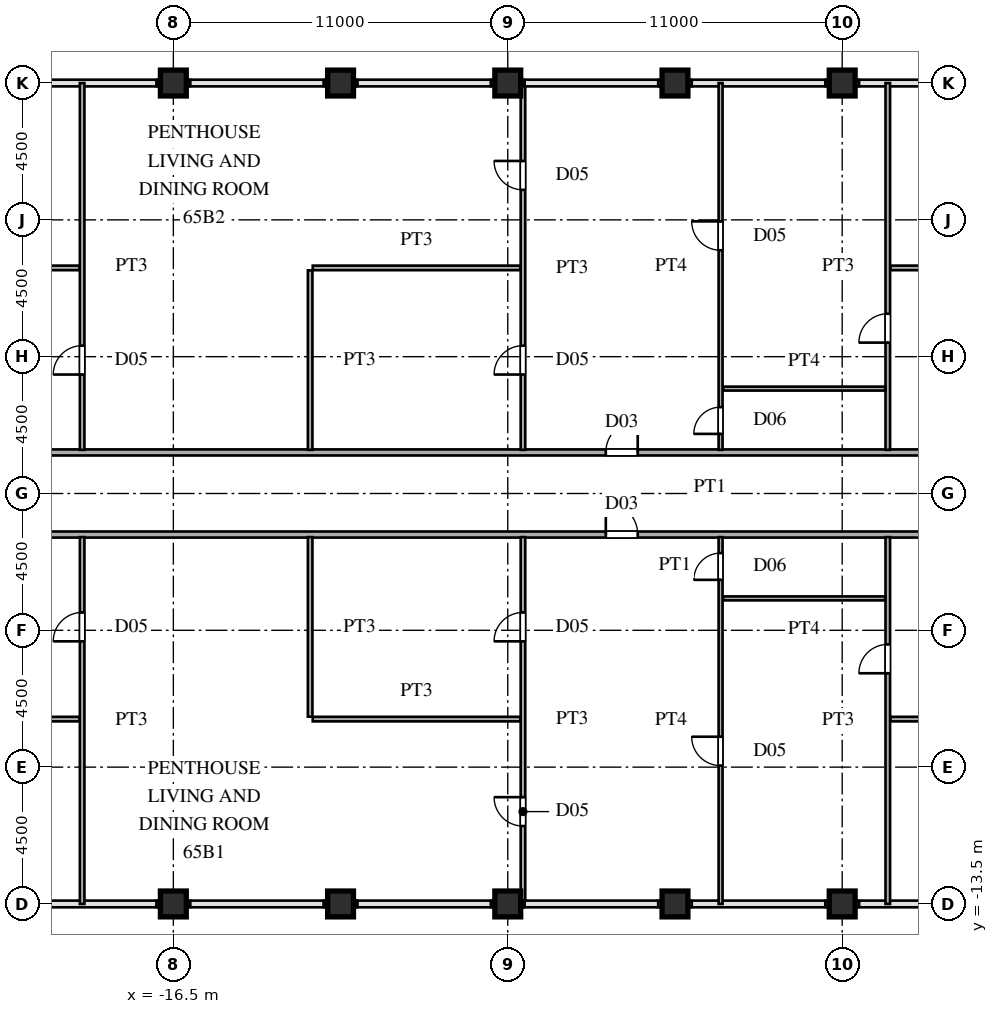
"""IFC4 building model, lengths in metres.
Left out: names, types, materials, properties, quantities, classifications, styles, units other than length and angle.
Written with IfcOpenShell. Run it as: python <this file> out.ifc"""

import sys

from ifc_helpers import new_model, si_unit, direction, frame, frame_2d, origin, origin_2d, place, context, subcontext, project, spatial, rectangle, hollow_rectangle, extrude, source, transform, mapped, element, fill, save


model = new_model("IFC4")
c1 = context("Model", 3, precision=1e-05, world=origin(), true_north=direction((0.0, 1.0)))
c2 = subcontext(c1, "Body", "Model", "MODEL_VIEW")
j1 = project(units=[si_unit("LENGTHUNIT", "METRE"), si_unit("PLANEANGLEUNIT", "RADIAN")], contexts=[c1])
p1 = place(None, origin())
s1 = spatial("IfcSite", under=j1, at=p1, CompositionType="ELEMENT")
p2 = place(p1, origin())
s2 = spatial("IfcBuilding", under=s1, at=p2, CompositionType="ELEMENT")
p3 = place(p2, frame((0.0, 0.0, 246.9)))
s3 = spatial("IfcBuildingStorey", under=s2, at=p3, CompositionType="ELEMENT", Elevation=246.9)
m1 = source(origin(), c2, "Body", "SweptSolid", [
    extrude(hollow_rectangle(XDim=0.85, YDim=0.85, WallThickness=0.036, at=origin_2d()), origin(), (0.0, 0.0, 1.0), 3.75),
])
for number, where, z_axis, x_axis in (
    (1, (-16.5, -13.5, 0.0), (0.0, 0.0, 1.0), (1.0, 0.0, 0.0)),
    (2, (-16.5, 13.5, 0.0), (0.0, 0.0, 1.0), (1.0, 0.0, 0.0)),
    (3, (-11.0, -13.5, 0.0), (0.0, 0.0, 1.0), (1.0, 0.0, 0.0)),
    (4, (-11.0, 13.5, 0.0), (0.0, 0.0, 1.0), (1.0, 0.0, 0.0)),
    (5, (-5.5, -13.5, 0.0), (0.0, 0.0, 1.0), (1.0, 0.0, 0.0)),
    (6, (-5.5, 13.5, 0.0), (0.0, 0.0, 1.0), (1.0, 0.0, 0.0)),
    (7, (0.0, -13.5, 0.0), (0.0, 0.0, 1.0), (1.0, 0.0, 0.0)),
    (8, (0.0, 13.5, 0.0), (0.0, 0.0, 1.0), (1.0, 0.0, 0.0)),
    (9, (5.5, -13.5, 0.0), (0.0, 0.0, 1.0), (1.0, 0.0, 0.0)),
    (10, (5.5, 13.5, 0.0), (0.0, 0.0, 1.0), (1.0, 0.0, 0.0)),
):
    element("IfcColumn", number, at=place(p3, frame(where, z_axis=z_axis, x_axis=x_axis)), inside=s3, PredefinedType="COLUMN", context=c2, shape_type="MappedRepresentation", body=[
        mapped(m1, transform((0.0, 0.0, 0.0), scale=1.0)),
    ])
for number, where, z_axis, x_axis in (
    (11, (-17.05, -13.5, 0.0), (0.0, 0.0, 1.0), (1.0, 0.0, 0.0)),
    (12, (-17.05, 13.5, 0.0), (0.0, 0.0, 1.0), (1.0, 0.0, 0.0)),
    (13, (-11.55, -13.5, 0.0), (0.0, 0.0, 1.0), (1.0, 0.0, 0.0)),
    (14, (-11.55, 13.5, 0.0), (0.0, 0.0, 1.0), (1.0, 0.0, 0.0)),
    (15, (-6.05, -13.5, 0.0), (0.0, 0.0, 1.0), (1.0, 0.0, 0.0)),
    (16, (-6.05, 13.5, 0.0), (0.0, 0.0, 1.0), (1.0, 0.0, 0.0)),
    (17, (-0.55, -13.5, 0.0), (0.0, 0.0, 1.0), (1.0, 0.0, 0.0)),
    (18, (-0.55, 13.5, 0.0), (0.0, 0.0, 1.0), (1.0, 0.0, 0.0)),
    (19, (4.95, -13.5, 0.0), (0.0, 0.0, 1.0), (1.0, 0.0, 0.0)),
    (20, (4.95, 13.5, 0.0), (0.0, 0.0, 1.0), (1.0, 0.0, 0.0)),
):
    element("IfcWall", number, at=place(p3, frame(where, z_axis=z_axis, x_axis=x_axis)), inside=s3, PredefinedType="SOLIDWALL", context=c2, shape_type="SweptSolid", body=[
        extrude(rectangle(XDim=1.1, YDim=0.21, at=frame_2d((0.55, 0.0))), origin(), (0.0, 0.0, 1.0), 3.03),
    ])
p4 = place(p3, frame((-27.245, -7.42, 0.0), z_axis=(0.0, 0.0, 1.0), x_axis=(1.0, 0.0, 0.0)))
e21 = element("IfcWall", 21, at=p4, inside=s3, PredefinedType="PARTITIONING", context=c2, shape_type="SweptSolid", body=[
    extrude(rectangle(XDim=7.66, YDim=0.15, at=frame_2d((3.83, 0.0))), origin(), (0.0, 0.0, 1.0), 3.53),
])
p5 = place(p4, frame((3.57, 0.0, 0.0)))
e22 = element("IfcOpeningElement", 22, at=p5, cuts=e21, PredefinedType="OPENING", context=c2, shape_type="SweptSolid", body=[
    extrude(rectangle(XDim=0.95, YDim=2.15, at=frame_2d((0.475, 1.075))), frame((0.0, 0.085, 0.0), z_axis=(0.0, -1.0, 0.0), x_axis=(1.0, 0.0, 0.0)), (0.0, 0.0, 1.0), 0.17),
])
p6 = place(p3, frame((-11.915, -7.42, 0.0), z_axis=(0.0, 0.0, 1.0), x_axis=(1.0, 0.0, 0.0)))
e23 = element("IfcWall", 23, at=p6, inside=s3, PredefinedType="PARTITIONING", context=c2, shape_type="SweptSolid", body=[
    extrude(rectangle(XDim=6.83, YDim=0.15, at=frame_2d((3.415, 0.0))), origin(), (0.0, 0.0, 1.0), 3.53),
])
p7 = place(p3, frame((7.085, -7.42, 0.0), z_axis=(0.0, 0.0, 1.0), x_axis=(1.0, 0.0, 0.0)))
e24 = element("IfcWall", 24, at=p7, inside=s3, PredefinedType="PARTITIONING", context=c2, shape_type="SweptSolid", body=[
    extrude(rectangle(XDim=20.16, YDim=0.15, at=frame_2d((10.08, 0.0))), origin(), (0.0, 0.0, 1.0), 3.53),
])
p8 = place(p7, frame((3.44, 0.0, 0.0)))
e25 = element("IfcOpeningElement", 25, at=p8, cuts=e24, PredefinedType="OPENING", context=c2, shape_type="SweptSolid", body=[
    extrude(rectangle(XDim=0.95, YDim=2.15, at=frame_2d((0.475, 1.075))), frame((0.0, 0.085, 0.0), z_axis=(0.0, -1.0, 0.0), x_axis=(1.0, 0.0, 0.0)), (0.0, 0.0, 1.0), 0.17),
])
p9 = place(p7, frame((10.69, 0.0, 0.0)))
e26 = element("IfcOpeningElement", 26, at=p9, cuts=e24, PredefinedType="OPENING", context=c2, shape_type="SweptSolid", body=[
    extrude(rectangle(XDim=0.95, YDim=2.15, at=frame_2d((0.475, 1.075))), frame((0.0, 0.085, 0.0), z_axis=(0.0, -1.0, 0.0), x_axis=(1.0, 0.0, 0.0)), (0.0, 0.0, 1.0), 0.17),
])
p10 = place(p7, frame((16.94, 0.0, 0.0)))
e27 = element("IfcOpeningElement", 27, at=p10, cuts=e24, PredefinedType="OPENING", context=c2, shape_type="SweptSolid", body=[
    extrude(rectangle(XDim=0.95, YDim=2.15, at=frame_2d((0.475, 1.075))), frame((0.0, 0.085, 0.0), z_axis=(0.0, -1.0, 0.0), x_axis=(1.0, 0.0, 0.0)), (0.0, 0.0, 1.0), 0.17),
])
p11 = place(p3, frame((1.585, -3.45, 0.0), z_axis=(0.0, 0.0, 1.0), x_axis=(1.0, 0.0, 0.0)))
e28 = element("IfcWall", 28, at=p11, inside=s3, PredefinedType="PARTITIONING", context=c2, shape_type="SweptSolid", body=[
    extrude(rectangle(XDim=5.33, YDim=0.13, at=frame_2d((2.665, 0.0))), origin(), (0.0, 0.0, 1.0), 3.53),
])
p12 = place(p3, frame((-27.245, -1.35, 0.0), z_axis=(0.0, 0.0, 1.0), x_axis=(1.0, 0.0, 0.0)))
e29 = element("IfcWall", 29, at=p12, inside=s3, PredefinedType="PARTITIONING", context=c2, shape_type="SweptSolid", body=[
    extrude(rectangle(XDim=54.49, YDim=0.2, at=frame_2d((27.245, 0.0))), origin(), (0.0, 0.0, 1.0), 3.53),
])
p13 = place(p12, frame((24.97, 0.0, 0.0)))
e30 = element("IfcOpeningElement", 30, at=p13, cuts=e29, PredefinedType="OPENING", context=c2, shape_type="SweptSolid", body=[
    extrude(rectangle(XDim=1.05, YDim=2.25, at=frame_2d((0.525, 1.125))), frame((0.0, 0.11, 0.0), z_axis=(0.0, -1.0, 0.0), x_axis=(1.0, 0.0, 0.0)), (0.0, 0.0, 1.0), 0.22),
])
p14 = place(p3, frame((-27.245, 1.35, 0.0), z_axis=(0.0, 0.0, 1.0), x_axis=(1.0, 0.0, 0.0)))
e31 = element("IfcWall", 31, at=p14, inside=s3, PredefinedType="PARTITIONING", context=c2, shape_type="SweptSolid", body=[
    extrude(rectangle(XDim=54.49, YDim=0.2, at=frame_2d((27.245, 0.0))), origin(), (0.0, 0.0, 1.0), 3.53),
])
p15 = place(p14, frame((24.97, 0.0, 0.0)))
e32 = element("IfcOpeningElement", 32, at=p15, cuts=e31, PredefinedType="OPENING", context=c2, shape_type="SweptSolid", body=[
    extrude(rectangle(XDim=1.05, YDim=2.25, at=frame_2d((0.525, 1.125))), frame((0.0, 0.11, 0.0), z_axis=(0.0, -1.0, 0.0), x_axis=(1.0, 0.0, 0.0)), (0.0, 0.0, 1.0), 0.22),
])
p16 = place(p3, frame((1.585, 3.45, 0.0), z_axis=(0.0, 0.0, 1.0), x_axis=(1.0, 0.0, 0.0)))
e33 = element("IfcWall", 33, at=p16, inside=s3, PredefinedType="PARTITIONING", context=c2, shape_type="SweptSolid", body=[
    extrude(rectangle(XDim=5.33, YDim=0.13, at=frame_2d((2.665, 0.0))), origin(), (0.0, 0.0, 1.0), 3.53),
])
p17 = place(p3, frame((-27.245, 7.42, 0.0), z_axis=(0.0, 0.0, 1.0), x_axis=(1.0, 0.0, 0.0)))
e34 = element("IfcWall", 34, at=p17, inside=s3, PredefinedType="PARTITIONING", context=c2, shape_type="SweptSolid", body=[
    extrude(rectangle(XDim=7.66, YDim=0.15, at=frame_2d((3.83, 0.0))), origin(), (0.0, 0.0, 1.0), 3.53),
])
p18 = place(p17, frame((3.57, 0.0, 0.0)))
e35 = element("IfcOpeningElement", 35, at=p18, cuts=e34, PredefinedType="OPENING", context=c2, shape_type="SweptSolid", body=[
    extrude(rectangle(XDim=0.95, YDim=2.15, at=frame_2d((0.475, 1.075))), frame((0.0, 0.085, 0.0), z_axis=(0.0, -1.0, 0.0), x_axis=(1.0, 0.0, 0.0)), (0.0, 0.0, 1.0), 0.17),
])
p19 = place(p3, frame((-11.915, 7.42, 0.0), z_axis=(0.0, 0.0, 1.0), x_axis=(1.0, 0.0, 0.0)))
e36 = element("IfcWall", 36, at=p19, inside=s3, PredefinedType="PARTITIONING", context=c2, shape_type="SweptSolid", body=[
    extrude(rectangle(XDim=6.83, YDim=0.15, at=frame_2d((3.415, 0.0))), origin(), (0.0, 0.0, 1.0), 3.53),
])
p20 = place(p3, frame((7.085, 7.42, 0.0), z_axis=(0.0, 0.0, 1.0), x_axis=(1.0, 0.0, 0.0)))
e37 = element("IfcWall", 37, at=p20, inside=s3, PredefinedType="PARTITIONING", context=c2, shape_type="SweptSolid", body=[
    extrude(rectangle(XDim=20.16, YDim=0.15, at=frame_2d((10.08, 0.0))), origin(), (0.0, 0.0, 1.0), 3.53),
])
p21 = place(p20, frame((3.44, 0.0, 0.0)))
e38 = element("IfcOpeningElement", 38, at=p21, cuts=e37, PredefinedType="OPENING", context=c2, shape_type="SweptSolid", body=[
    extrude(rectangle(XDim=0.95, YDim=2.15, at=frame_2d((0.475, 1.075))), frame((0.0, 0.085, 0.0), z_axis=(0.0, -1.0, 0.0), x_axis=(1.0, 0.0, 0.0)), (0.0, 0.0, 1.0), 0.17),
])
p22 = place(p20, frame((10.69, 0.0, 0.0)))
e39 = element("IfcOpeningElement", 39, at=p22, cuts=e37, PredefinedType="OPENING", context=c2, shape_type="SweptSolid", body=[
    extrude(rectangle(XDim=0.95, YDim=2.15, at=frame_2d((0.475, 1.075))), frame((0.0, 0.085, 0.0), z_axis=(0.0, -1.0, 0.0), x_axis=(1.0, 0.0, 0.0)), (0.0, 0.0, 1.0), 0.17),
])
p23 = place(p20, frame((16.94, 0.0, 0.0)))
e40 = element("IfcOpeningElement", 40, at=p23, cuts=e37, PredefinedType="OPENING", context=c2, shape_type="SweptSolid", body=[
    extrude(rectangle(XDim=0.95, YDim=2.15, at=frame_2d((0.475, 1.075))), frame((0.0, 0.085, 0.0), z_axis=(0.0, -1.0, 0.0), x_axis=(1.0, 0.0, 0.0)), (0.0, 0.0, 1.0), 0.17),
])
p24 = place(p3, frame((-19.5, -13.5, 0.0), z_axis=(0.0, 0.0, 1.0), x_axis=(0.0, 1.0, 0.0)))
e41 = element("IfcWall", 41, at=p24, inside=s3, PredefinedType="PARTITIONING", context=c2, shape_type="SweptSolid", body=[
    extrude(rectangle(XDim=12.065, YDim=0.15, at=frame_2d((6.032, 0.0))), origin(), (0.0, 0.0, 1.0), 3.53),
])
p25 = place(p24, frame((8.637, 0.0, 0.0)))
e42 = element("IfcOpeningElement", 42, at=p25, cuts=e41, PredefinedType="OPENING", context=c2, shape_type="SweptSolid", body=[
    extrude(rectangle(XDim=0.95, YDim=2.15, at=frame_2d((0.475, 1.075))), frame((0.0, 0.085, 0.0), z_axis=(0.0, -1.0, 0.0), x_axis=(1.0, 0.0, 0.0)), (0.0, 0.0, 1.0), 0.17),
])
p26 = place(p3, frame((-19.5, 1.435, 0.0), z_axis=(0.0, 0.0, 1.0), x_axis=(0.0, 1.0, 0.0)))
e43 = element("IfcWall", 43, at=p26, inside=s3, PredefinedType="PARTITIONING", context=c2, shape_type="SweptSolid", body=[
    extrude(rectangle(XDim=12.065, YDim=0.15, at=frame_2d((6.032, 0.0))), origin(), (0.0, 0.0, 1.0), 3.53),
])
p27 = place(p26, frame((2.478, 0.0, 0.0)))
e44 = element("IfcOpeningElement", 44, at=p27, cuts=e43, PredefinedType="OPENING", context=c2, shape_type="SweptSolid", body=[
    extrude(rectangle(XDim=0.95, YDim=2.15, at=frame_2d((0.475, 1.075))), frame((0.0, 0.085, 0.0), z_axis=(0.0, -1.0, 0.0), x_axis=(1.0, 0.0, 0.0)), (0.0, 0.0, 1.0), 0.17),
])
for number, where, z_axis, x_axis in (
    (45, (-12.0, -7.34, 0.0), (0.0, 0.0, 1.0), (0.0, 1.0, 0.0)),
    (46, (-12.0, 1.435, 0.0), (0.0, 0.0, 1.0), (0.0, 1.0, 0.0)),
):
    element("IfcWall", number, at=place(p3, frame(where, z_axis=z_axis, x_axis=x_axis)), inside=s3, PredefinedType="PARTITIONING", context=c2, shape_type="SweptSolid", body=[
        extrude(rectangle(XDim=5.905, YDim=0.15, at=frame_2d((2.953, 0.0))), origin(), (0.0, 0.0, 1.0), 3.53),
    ])
p28 = place(p3, frame((-5.0, -13.39, 0.0), z_axis=(0.0, 0.0, 1.0), x_axis=(0.0, 1.0, 0.0)))
e47 = element("IfcWall", 47, at=p28, inside=s3, PredefinedType="PARTITIONING", context=c2, shape_type="SweptSolid", body=[
    extrude(rectangle(XDim=11.955, YDim=0.15, at=frame_2d((5.978, 0.0))), origin(), (0.0, 0.0, 1.0), 3.53),
])
p29 = place(p28, frame((8.528, 0.0, 0.0)))
e48 = element("IfcOpeningElement", 48, at=p29, cuts=e47, PredefinedType="OPENING", context=c2, shape_type="SweptSolid", body=[
    extrude(rectangle(XDim=0.95, YDim=2.15, at=frame_2d((0.475, 1.075))), frame((0.0, 0.085, 0.0), z_axis=(0.0, -1.0, 0.0), x_axis=(1.0, 0.0, 0.0)), (0.0, 0.0, 1.0), 0.17),
])
p30 = place(p28, frame((2.452, 0.0, 0.0)))
e49 = element("IfcOpeningElement", 49, at=p30, cuts=e47, PredefinedType="OPENING", context=c2, shape_type="SweptSolid", body=[
    extrude(rectangle(XDim=0.95, YDim=2.15, at=frame_2d((0.475, 1.075))), frame((0.0, 0.085, 0.0), z_axis=(0.0, -1.0, 0.0), x_axis=(1.0, 0.0, 0.0)), (0.0, 0.0, 1.0), 0.17),
])
p31 = place(p3, frame((-5.0, 1.435, 0.0), z_axis=(0.0, 0.0, 1.0), x_axis=(0.0, 1.0, 0.0)))
e50 = element("IfcWall", 50, at=p31, inside=s3, PredefinedType="PARTITIONING", context=c2, shape_type="SweptSolid", body=[
    extrude(rectangle(XDim=11.955, YDim=0.15, at=frame_2d((5.978, 0.0))), origin(), (0.0, 0.0, 1.0), 3.53),
])
p32 = place(p31, frame((2.478, 0.0, 0.0)))
e51 = element("IfcOpeningElement", 51, at=p32, cuts=e50, PredefinedType="OPENING", context=c2, shape_type="SweptSolid", body=[
    extrude(rectangle(XDim=0.95, YDim=2.15, at=frame_2d((0.475, 1.075))), frame((0.0, 0.085, 0.0), z_axis=(0.0, -1.0, 0.0), x_axis=(1.0, 0.0, 0.0)), (0.0, 0.0, 1.0), 0.17),
])
p33 = place(p31, frame((8.552, 0.0, 0.0)))
e52 = element("IfcOpeningElement", 52, at=p33, cuts=e50, PredefinedType="OPENING", context=c2, shape_type="SweptSolid", body=[
    extrude(rectangle(XDim=0.95, YDim=2.15, at=frame_2d((0.475, 1.075))), frame((0.0, 0.085, 0.0), z_axis=(0.0, -1.0, 0.0), x_axis=(1.0, 0.0, 0.0)), (0.0, 0.0, 1.0), 0.17),
])
p34 = place(p3, frame((1.5, -13.5, 0.0), z_axis=(0.0, 0.0, 1.0), x_axis=(0.0, 1.0, 0.0)))
e53 = element("IfcWall", 53, at=p34, inside=s3, PredefinedType="PARTITIONING", context=c2, shape_type="SweptSolid", body=[
    extrude(rectangle(XDim=12.065, YDim=0.13, at=frame_2d((6.032, 0.0))), origin(), (0.0, 0.0, 1.0), 3.53),
])
p35 = place(p34, frame((10.66, 0.0, 0.0)))
e54 = element("IfcOpeningElement", 54, at=p35, cuts=e53, PredefinedType="OPENING", context=c2, shape_type="SweptSolid", body=[
    extrude(rectangle(XDim=0.88, YDim=2.1, at=frame_2d((0.44, 1.05))), frame((0.0, 0.075, 0.0), z_axis=(0.0, -1.0, 0.0), x_axis=(1.0, 0.0, 0.0)), (0.0, 0.0, 1.0), 0.15),
])
p36 = place(p34, frame((4.55, 0.0, 0.0)))
e55 = element("IfcOpeningElement", 55, at=p36, cuts=e53, PredefinedType="OPENING", context=c2, shape_type="SweptSolid", body=[
    extrude(rectangle(XDim=0.95, YDim=2.15, at=frame_2d((0.475, 1.075))), frame((0.0, 0.075, 0.0), z_axis=(0.0, -1.0, 0.0), x_axis=(1.0, 0.0, 0.0)), (0.0, 0.0, 1.0), 0.15),
])
p37 = place(p3, frame((1.5, 1.435, 0.0), z_axis=(0.0, 0.0, 1.0), x_axis=(0.0, 1.0, 0.0)))
e56 = element("IfcWall", 56, at=p37, inside=s3, PredefinedType="PARTITIONING", context=c2, shape_type="SweptSolid", body=[
    extrude(rectangle(XDim=12.065, YDim=0.13, at=frame_2d((6.032, 0.0))), origin(), (0.0, 0.0, 1.0), 3.53),
])
p38 = place(p37, frame((0.525, 0.0, 0.0)))
e57 = element("IfcOpeningElement", 57, at=p38, cuts=e56, PredefinedType="OPENING", context=c2, shape_type="SweptSolid", body=[
    extrude(rectangle(XDim=0.88, YDim=2.1, at=frame_2d((0.44, 1.05))), frame((0.0, 0.075, 0.0), z_axis=(0.0, -1.0, 0.0), x_axis=(1.0, 0.0, 0.0)), (0.0, 0.0, 1.0), 0.15),
])
p39 = place(p37, frame((6.565, 0.0, 0.0)))
e58 = element("IfcOpeningElement", 58, at=p39, cuts=e56, PredefinedType="OPENING", context=c2, shape_type="SweptSolid", body=[
    extrude(rectangle(XDim=0.95, YDim=2.15, at=frame_2d((0.475, 1.075))), frame((0.0, 0.075, 0.0), z_axis=(0.0, -1.0, 0.0), x_axis=(1.0, 0.0, 0.0)), (0.0, 0.0, 1.0), 0.15),
])
p40 = place(p3, frame((7.0, -13.5, 0.0), z_axis=(0.0, 0.0, 1.0), x_axis=(0.0, 1.0, 0.0)))
e59 = element("IfcWall", 59, at=p40, inside=s3, PredefinedType="PARTITIONING", context=c2, shape_type="SweptSolid", body=[
    extrude(rectangle(XDim=12.065, YDim=0.15, at=frame_2d((6.032, 0.0))), origin(), (0.0, 0.0, 1.0), 3.53),
])
p41 = place(p40, frame((7.587, 0.0, 0.0)))
e60 = element("IfcOpeningElement", 60, at=p41, cuts=e59, PredefinedType="OPENING", context=c2, shape_type="SweptSolid", body=[
    extrude(rectangle(XDim=0.95, YDim=2.15, at=frame_2d((0.475, 1.075))), frame((0.0, 0.085, 0.0), z_axis=(0.0, -1.0, 0.0), x_axis=(1.0, 0.0, 0.0)), (0.0, 0.0, 1.0), 0.17),
])
p42 = place(p3, frame((7.0, 1.435, 0.0), z_axis=(0.0, 0.0, 1.0), x_axis=(0.0, 1.0, 0.0)))
e61 = element("IfcWall", 61, at=p42, inside=s3, PredefinedType="PARTITIONING", context=c2, shape_type="SweptSolid", body=[
    extrude(rectangle(XDim=12.065, YDim=0.15, at=frame_2d((6.032, 0.0))), origin(), (0.0, 0.0, 1.0), 3.53),
])
p43 = place(p42, frame((3.528, 0.0, 0.0)))
e62 = element("IfcOpeningElement", 62, at=p43, cuts=e61, PredefinedType="OPENING", context=c2, shape_type="SweptSolid", body=[
    extrude(rectangle(XDim=0.95, YDim=2.15, at=frame_2d((0.475, 1.075))), frame((0.0, 0.085, 0.0), z_axis=(0.0, -1.0, 0.0), x_axis=(1.0, 0.0, 0.0)), (0.0, 0.0, 1.0), 0.17),
])
m2 = source(origin(), c2, "Body", "SweptSolid", [
    extrude(rectangle(XDim=1.05, YDim=2.25, at=frame_2d((0.525, 1.125))), frame((0.0, 0.025, 0.0), z_axis=(0.0, -1.0, 0.0), x_axis=(1.0, 0.0, 0.0)), (0.0, 0.0, 1.0), 0.05),
])
p44 = place(p13, origin())
e63 = element("IfcDoor", 63, at=p44, inside=s3, OperationType="SINGLE_SWING_LEFT", PredefinedType="DOOR", context=c2, shape_type="MappedRepresentation", body=[
    mapped(m2, transform((0.0, 0.0, 0.0), scale=1.0)),
])
fill(e30, e63)
p45 = place(p15, origin())
e64 = element("IfcDoor", 64, at=p45, inside=s3, OperationType="SINGLE_SWING_RIGHT", PredefinedType="DOOR", context=c2, shape_type="MappedRepresentation", body=[
    mapped(m2, transform((0.0, 0.0, 0.0), scale=1.0)),
])
fill(e32, e64)
m3 = source(origin(), c2, "Body", "SweptSolid", [
    extrude(rectangle(XDim=0.95, YDim=2.15, at=frame_2d((0.475, 1.075))), frame((0.0, 0.025, 0.0), z_axis=(0.0, -1.0, 0.0), x_axis=(1.0, 0.0, 0.0)), (0.0, 0.0, 1.0), 0.05),
])
p46 = place(p25, origin())
e65 = element("IfcDoor", 65, at=p46, inside=s3, OperationType="SINGLE_SWING_LEFT", PredefinedType="DOOR", context=c2, shape_type="MappedRepresentation", body=[
    mapped(m3, transform((0.0, 0.0, 0.0), scale=1.0)),
])
fill(e42, e65)
p47 = place(p27, origin())
e66 = element("IfcDoor", 66, at=p47, inside=s3, OperationType="SINGLE_SWING_LEFT", PredefinedType="DOOR", context=c2, shape_type="MappedRepresentation", body=[
    mapped(m3, transform((0.0, 0.0, 0.0), scale=1.0)),
])
fill(e44, e66)
p48 = place(p29, origin())
e67 = element("IfcDoor", 67, at=p48, inside=s3, OperationType="SINGLE_SWING_LEFT", PredefinedType="DOOR", context=c2, shape_type="MappedRepresentation", body=[
    mapped(m3, transform((0.0, 0.0, 0.0), scale=1.0)),
])
fill(e48, e67)
p49 = place(p30, origin())
e68 = element("IfcDoor", 68, at=p49, inside=s3, OperationType="SINGLE_SWING_RIGHT", PredefinedType="DOOR", context=c2, shape_type="MappedRepresentation", body=[
    mapped(m3, transform((0.0, 0.0, 0.0), scale=1.0)),
])
fill(e49, e68)
p50 = place(p32, origin())
e69 = element("IfcDoor", 69, at=p50, inside=s3, OperationType="SINGLE_SWING_LEFT", PredefinedType="DOOR", context=c2, shape_type="MappedRepresentation", body=[
    mapped(m3, transform((0.0, 0.0, 0.0), scale=1.0)),
])
fill(e51, e69)
p51 = place(p33, origin())
e70 = element("IfcDoor", 70, at=p51, inside=s3, OperationType="SINGLE_SWING_RIGHT", PredefinedType="DOOR", context=c2, shape_type="MappedRepresentation", body=[
    mapped(m3, transform((0.0, 0.0, 0.0), scale=1.0)),
])
fill(e52, e70)
m4 = source(origin(), c2, "Body", "SweptSolid", [
    extrude(rectangle(XDim=0.88, YDim=2.1, at=frame_2d((0.44, 1.05))), frame((0.0, 0.025, 0.0), z_axis=(0.0, -1.0, 0.0), x_axis=(1.0, 0.0, 0.0)), (0.0, 0.0, 1.0), 0.05),
])
p52 = place(p35, origin())
e71 = element("IfcDoor", 71, at=p52, inside=s3, OperationType="SINGLE_SWING_LEFT", PredefinedType="DOOR", context=c2, shape_type="MappedRepresentation", body=[
    mapped(m4, transform((0.0, 0.0, 0.0), scale=1.0)),
])
fill(e54, e71)
p53 = place(p36, origin())
e72 = element("IfcDoor", 72, at=p53, inside=s3, OperationType="SINGLE_SWING_RIGHT", PredefinedType="DOOR", context=c2, shape_type="MappedRepresentation", body=[
    mapped(m3, transform((0.0, 0.0, 0.0), scale=1.0)),
])
fill(e55, e72)
p54 = place(p38, origin())
e73 = element("IfcDoor", 73, at=p54, inside=s3, OperationType="SINGLE_SWING_LEFT", PredefinedType="DOOR", context=c2, shape_type="MappedRepresentation", body=[
    mapped(m4, transform((0.0, 0.0, 0.0), scale=1.0)),
])
fill(e57, e73)
p55 = place(p39, origin())
e74 = element("IfcDoor", 74, at=p55, inside=s3, OperationType="SINGLE_SWING_RIGHT", PredefinedType="DOOR", context=c2, shape_type="MappedRepresentation", body=[
    mapped(m3, transform((0.0, 0.0, 0.0), scale=1.0)),
])
fill(e58, e74)
p56 = place(p41, origin())
e75 = element("IfcDoor", 75, at=p56, inside=s3, OperationType="SINGLE_SWING_LEFT", PredefinedType="DOOR", context=c2, shape_type="MappedRepresentation", body=[
    mapped(m3, transform((0.0, 0.0, 0.0), scale=1.0)),
])
fill(e60, e75)
p57 = place(p43, origin())
e76 = element("IfcDoor", 76, at=p57, inside=s3, OperationType="SINGLE_SWING_LEFT", PredefinedType="DOOR", context=c2, shape_type="MappedRepresentation", body=[
    mapped(m3, transform((0.0, 0.0, 0.0), scale=1.0)),
])
fill(e62, e76)
save(model, sys.argv[1])
